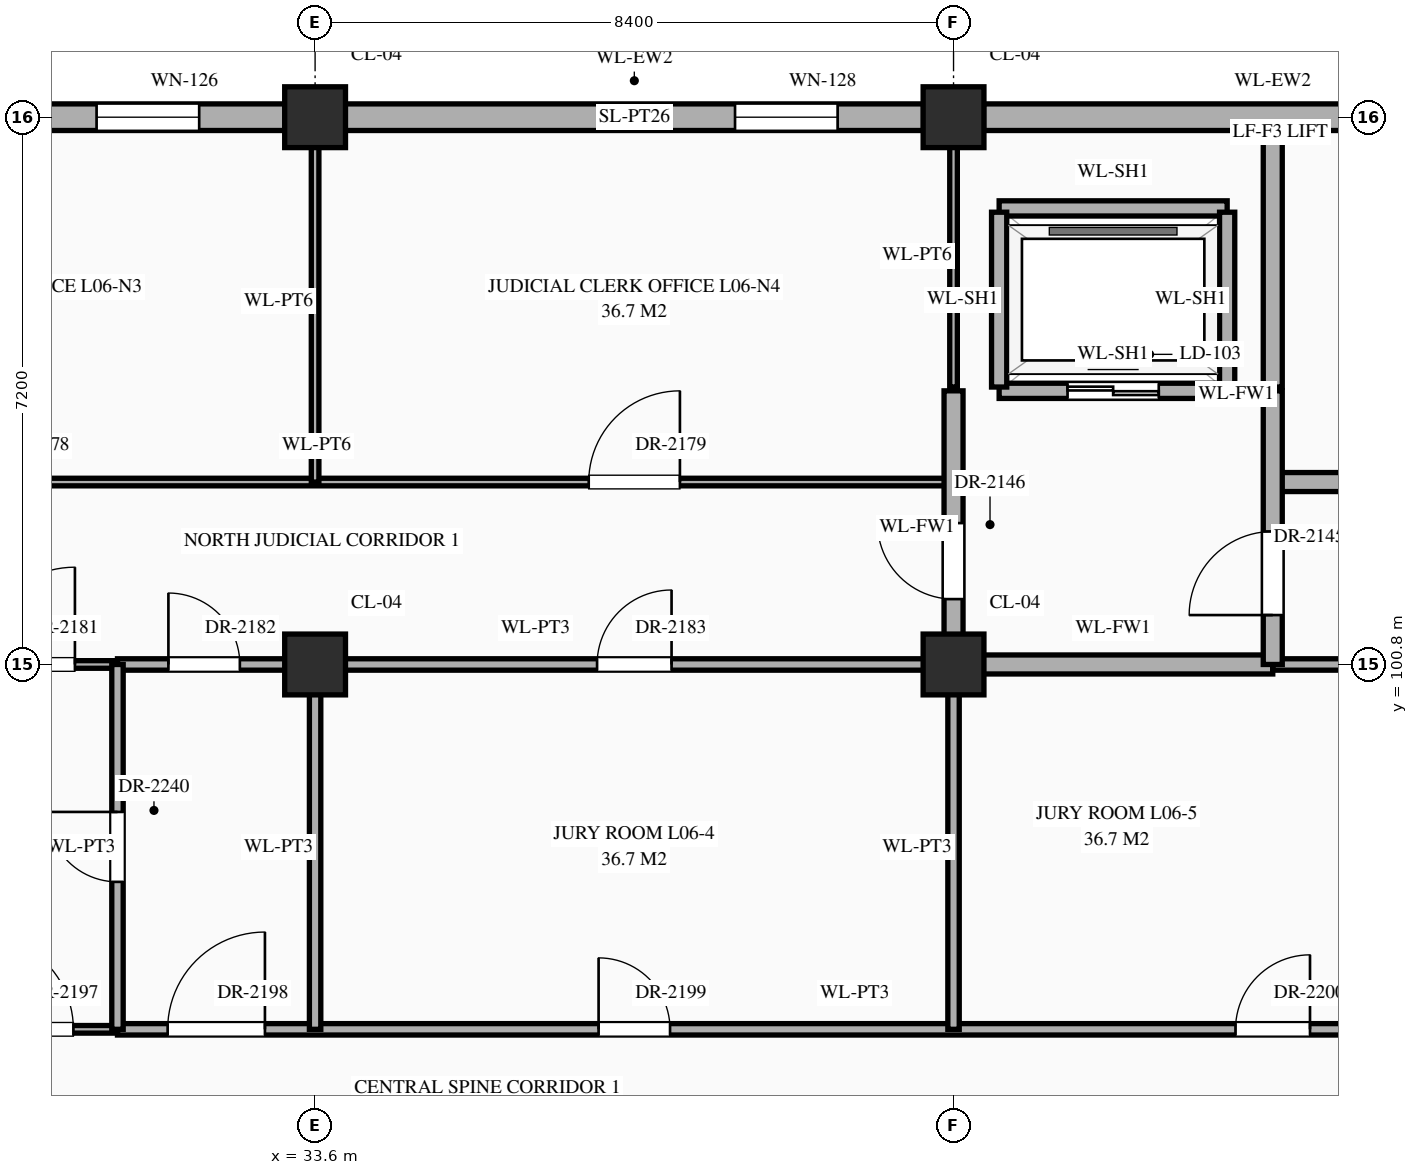
"""IFC4 building model, lengths in metres.
Left out: names, types, materials, properties, quantities, classifications, styles, units other than length and angle.
Written with IfcOpenShell. Run it as: python <this file> out.ifc"""

import sys

from ifc_helpers import new_model, si_unit, direction, frame, frame_2d, origin, origin_2d, place, context, subcontext, project, spatial, rectangle, extrude, element, fill, save


model = new_model("IFC4")
c1 = context("Model", 3, precision=1e-05, world=origin(), true_north=direction((0.0, 1.0)))
c2 = subcontext(c1, "Body", "Model", "MODEL_VIEW")
j1 = project(units=[si_unit("LENGTHUNIT", "METRE"), si_unit("PLANEANGLEUNIT", "RADIAN")], contexts=[c1])
p1 = place(None, origin())
s1 = spatial("IfcSite", under=j1, at=p1, CompositionType="ELEMENT")
p2 = place(p1, origin())
s2 = spatial("IfcBuilding", under=s1, at=p2, CompositionType="ELEMENT")
p3 = place(p2, frame((0.0, 0.0, 26.1)))
s3 = spatial("IfcBuildingStorey", under=s2, at=p3, CompositionType="ELEMENT", Elevation=26.1)
for number, where, z_axis, x_axis in (
    (1, (33.6, 100.8, 0.0), (0.0, 0.0, 1.0), (1.0, 0.0, 0.0)),
    (2, (33.6, 108.0, 0.0), (0.0, 0.0, 1.0), (1.0, 0.0, 0.0)),
    (3, (42.0, 100.8, 0.0), (0.0, 0.0, 1.0), (1.0, 0.0, 0.0)),
    (4, (42.0, 108.0, 0.0), (0.0, 0.0, 1.0), (1.0, 0.0, 0.0)),
):
    element("IfcColumn", number, at=place(p3, frame(where, z_axis=z_axis, x_axis=x_axis)), inside=s3, PredefinedType="COLUMN", context=c2, shape_type="SweptSolid", body=[
        extrude(rectangle(XDim=0.8, YDim=0.8, at=origin_2d()), origin(), (0.0, 0.0, 1.0), 4.5),
    ])
p4 = place(p3, frame((25.595, 108.0, 0.0), z_axis=(0.0, 0.0, 1.0), x_axis=(1.0, 0.0, 0.0)))
e5 = element("IfcWall", 5, at=p4, inside=s3, PredefinedType="STANDARD", context=c2, shape_type="SweptSolid", body=[
    extrude(rectangle(XDim=7.61, YDim=0.35, at=frame_2d((3.805, 0.0))), origin(), (0.0, 0.0, 1.0), 3.59),
])
p5 = place(p4, frame((5.13, 0.0, 0.85)))
e6 = element("IfcOpeningElement", 6, at=p5, cuts=e5, PredefinedType="OPENING", context=c2, shape_type="SweptSolid", body=[
    extrude(rectangle(XDim=1.35, YDim=1.74, at=frame_2d((0.675, 0.87))), frame((0.0, 0.187, 0.0), z_axis=(0.0, -1.0, 0.0), x_axis=(1.0, 0.0, 0.0)), (0.0, 0.0, 1.0), 0.374),
])
p6 = place(p3, frame((33.995, 108.0, 0.0), z_axis=(0.0, 0.0, 1.0), x_axis=(1.0, 0.0, 0.0)))
e7 = element("IfcWall", 7, at=p6, inside=s3, PredefinedType="STANDARD", context=c2, shape_type="SweptSolid", body=[
    extrude(rectangle(XDim=7.61, YDim=0.35, at=frame_2d((3.805, 0.0))), origin(), (0.0, 0.0, 1.0), 3.59),
])
p7 = place(p6, frame((5.13, 0.0, 0.85)))
e8 = element("IfcOpeningElement", 8, at=p7, cuts=e7, PredefinedType="OPENING", context=c2, shape_type="SweptSolid", body=[
    extrude(rectangle(XDim=1.35, YDim=1.92, at=frame_2d((0.675, 0.96))), frame((0.0, 0.187, 0.0), z_axis=(0.0, -1.0, 0.0), x_axis=(1.0, 0.0, 0.0)), (0.0, 0.0, 1.0), 0.374),
])
p8 = place(p3, frame((42.395, 108.0, 0.0), z_axis=(0.0, 0.0, 1.0), x_axis=(1.0, 0.0, 0.0)))
e9 = element("IfcWall", 9, at=p8, inside=s3, PredefinedType="STANDARD", context=c2, shape_type="SweptSolid", body=[
    extrude(rectangle(XDim=7.61, YDim=0.35, at=frame_2d((3.805, 0.0))), origin(), (0.0, 0.0, 1.0), 3.59),
])
p9 = place(p3, frame((25.24, 96.0, 0.0), z_axis=(0.0, 0.0, 1.0), x_axis=(1.0, 0.0, 0.0)))
e10 = element("IfcWall", 10, at=p9, inside=s3, PredefinedType="STANDARD", context=c2, shape_type="SweptSolid", body=[
    extrude(rectangle(XDim=5.76, YDim=0.1, at=frame_2d((2.88, 0.0))), origin(), (0.0, 0.0, 1.0), 4.24),
])
p10 = place(p9, frame((1.08, 0.0, 0.0)))
e11 = element("IfcOpeningElement", 11, at=p10, cuts=e10, PredefinedType="OPENING", context=c2, shape_type="SweptSolid", body=[
    extrude(rectangle(XDim=1.2, YDim=2.35, at=frame_2d((0.6, 1.175))), frame((0.0, 0.062, 0.0), z_axis=(0.0, -1.0, 0.0), x_axis=(1.0, 0.0, 0.0)), (0.0, 0.0, 1.0), 0.124),
])
p11 = place(p9, frame((3.94, 0.0, 0.0)))
e12 = element("IfcOpeningElement", 12, at=p11, cuts=e10, PredefinedType="OPENING", context=c2, shape_type="SweptSolid", body=[
    extrude(rectangle(XDim=1.24, YDim=2.3, at=frame_2d((0.62, 1.15))), frame((0.0, 0.062, 0.0), z_axis=(0.0, -1.0, 0.0), x_axis=(1.0, 0.0, 0.0)), (0.0, 0.0, 1.0), 0.124),
])
p12 = place(p3, frame((31.0, 96.0, 0.0), z_axis=(0.0, 0.0, 1.0), x_axis=(1.0, 0.0, 0.0)))
e13 = element("IfcWall", 13, at=p12, inside=s3, PredefinedType="STANDARD", context=c2, shape_type="SweptSolid", body=[
    extrude(rectangle(XDim=19.4, YDim=0.15, at=frame_2d((9.7, 0.0))), origin(), (0.0, 0.0, 1.0), 4.24),
])
p13 = place(p12, frame((0.66, 0.0, 0.0)))
e14 = element("IfcOpeningElement", 14, at=p13, cuts=e13, PredefinedType="OPENING", context=c2, shape_type="SweptSolid", body=[
    extrude(rectangle(XDim=1.28, YDim=2.35, at=frame_2d((0.64, 1.175))), frame((0.0, 0.087, 0.0), z_axis=(0.0, -1.0, 0.0), x_axis=(1.0, 0.0, 0.0)), (0.0, 0.0, 1.0), 0.174),
])
p14 = place(p12, frame((6.33, 0.0, 0.0)))
e15 = element("IfcOpeningElement", 15, at=p14, cuts=e13, PredefinedType="OPENING", context=c2, shape_type="SweptSolid", body=[
    extrude(rectangle(XDim=0.94, YDim=2.3, at=frame_2d((0.47, 1.15))), frame((0.0, 0.087, 0.0), z_axis=(0.0, -1.0, 0.0), x_axis=(1.0, 0.0, 0.0)), (0.0, 0.0, 1.0), 0.174),
])
p15 = place(p12, frame((14.71, 0.0, 0.0)))
e16 = element("IfcOpeningElement", 16, at=p15, cuts=e13, PredefinedType="OPENING", context=c2, shape_type="SweptSolid", body=[
    extrude(rectangle(XDim=0.98, YDim=2.35, at=frame_2d((0.49, 1.175))), frame((0.0, 0.087, 0.0), z_axis=(0.0, -1.0, 0.0), x_axis=(1.0, 0.0, 0.0)), (0.0, 0.0, 1.0), 0.174),
])
p16 = place(p3, frame((25.24, 100.8, 0.0), z_axis=(0.0, 0.0, 1.0), x_axis=(1.0, 0.0, 0.0)))
e17 = element("IfcWall", 17, at=p16, inside=s3, PredefinedType="STANDARD", context=c2, shape_type="SweptSolid", body=[
    extrude(rectangle(XDim=5.76, YDim=0.1, at=frame_2d((2.88, 0.0))), origin(), (0.0, 0.0, 1.0), 3.39),
])
p17 = place(p16, frame((1.2, 0.0, 0.0)))
e18 = element("IfcOpeningElement", 18, at=p17, cuts=e17, PredefinedType="OPENING", context=c2, shape_type="SweptSolid", body=[
    extrude(rectangle(XDim=1.24, YDim=2.3, at=frame_2d((0.62, 1.15))), frame((0.0, 0.062, 0.0), z_axis=(0.0, -1.0, 0.0), x_axis=(1.0, 0.0, 0.0)), (0.0, 0.0, 1.0), 0.124),
])
p18 = place(p16, frame((3.92, 0.0, 0.0)))
e19 = element("IfcOpeningElement", 19, at=p18, cuts=e17, PredefinedType="OPENING", context=c2, shape_type="SweptSolid", body=[
    extrude(rectangle(XDim=1.28, YDim=2.35, at=frame_2d((0.64, 1.175))), frame((0.0, 0.062, 0.0), z_axis=(0.0, -1.0, 0.0), x_axis=(1.0, 0.0, 0.0)), (0.0, 0.0, 1.0), 0.124),
])
p19 = place(p3, frame((31.0, 100.8, 0.0), z_axis=(0.0, 0.0, 1.0), x_axis=(1.0, 0.0, 0.0)))
e20 = element("IfcWall", 20, at=p19, inside=s3, PredefinedType="STANDARD", context=c2, shape_type="SweptSolid", body=[
    extrude(rectangle(XDim=11.0, YDim=0.15, at=frame_2d((5.5, 0.0))), origin(), (0.0, 0.0, 1.0), 3.39),
])
p20 = place(p19, frame((0.67, 0.0, 0.0)))
e21 = element("IfcOpeningElement", 21, at=p20, cuts=e20, PredefinedType="OPENING", context=c2, shape_type="SweptSolid", body=[
    extrude(rectangle(XDim=0.94, YDim=2.3, at=frame_2d((0.47, 1.15))), frame((0.0, 0.087, 0.0), z_axis=(0.0, -1.0, 0.0), x_axis=(1.0, 0.0, 0.0)), (0.0, 0.0, 1.0), 0.174),
])
p21 = place(p19, frame((6.31, 0.0, 0.0)))
e22 = element("IfcOpeningElement", 22, at=p21, cuts=e20, PredefinedType="OPENING", context=c2, shape_type="SweptSolid", body=[
    extrude(rectangle(XDim=0.98, YDim=2.35, at=frame_2d((0.49, 1.175))), frame((0.0, 0.087, 0.0), z_axis=(0.0, -1.0, 0.0), x_axis=(1.0, 0.0, 0.0)), (0.0, 0.0, 1.0), 0.174),
])
p22 = place(p3, frame((42.0, 100.8, 0.0), z_axis=(0.0, 0.0, 1.0), x_axis=(1.0, 0.0, 0.0)))
e23 = element("IfcWall", 23, at=p22, inside=s3, PredefinedType="STANDARD", context=c2, shape_type="SweptSolid", body=[
    extrude(rectangle(XDim=4.2, YDim=0.25, at=frame_2d((2.1, 0.0))), origin(), (0.0, 0.0, 1.0), 3.39),
])
p23 = place(p3, frame((46.2, 100.8, 0.0), z_axis=(0.0, 0.0, 1.0), x_axis=(1.0, 0.0, 0.0)))
e24 = element("IfcWall", 24, at=p23, inside=s3, PredefinedType="STANDARD", context=c2, shape_type="SweptSolid", body=[
    extrude(rectangle(XDim=4.2, YDim=0.15, at=frame_2d((2.1, 0.0))), origin(), (0.0, 0.0, 1.0), 3.39),
])
p24 = place(p23, frame((1.45, 0.0, 0.0)))
e25 = element("IfcOpeningElement", 25, at=p24, cuts=e24, PredefinedType="OPENING", context=c2, shape_type="SweptSolid", body=[
    extrude(rectangle(XDim=0.98, YDim=2.35, at=frame_2d((0.49, 1.175))), frame((0.0, 0.087, 0.0), z_axis=(0.0, -1.0, 0.0), x_axis=(1.0, 0.0, 0.0)), (0.0, 0.0, 1.0), 0.174),
])
p25 = place(p3, frame((25.24, 103.2, 0.0), z_axis=(0.0, 0.0, 1.0), x_axis=(1.0, 0.0, 0.0)))
e26 = element("IfcWall", 26, at=p25, inside=s3, PredefinedType="STANDARD", context=c2, shape_type="SweptSolid", body=[
    extrude(rectangle(XDim=16.76, YDim=0.1, at=frame_2d((8.38, 0.0))), origin(), (0.0, 0.0, 1.0), 4.24),
])
p26 = place(p25, frame((3.6, 0.0, 0.0)))
e27 = element("IfcOpeningElement", 27, at=p26, cuts=e26, PredefinedType="OPENING", context=c2, shape_type="SweptSolid", body=[
    extrude(rectangle(XDim=1.16, YDim=2.3, at=frame_2d((0.58, 1.15))), frame((0.0, 0.062, 0.0), z_axis=(0.0, -1.0, 0.0), x_axis=(1.0, 0.0, 0.0)), (0.0, 0.0, 1.0), 0.124),
])
p27 = place(p25, frame((11.96, 0.0, 0.0)))
e28 = element("IfcOpeningElement", 28, at=p27, cuts=e26, PredefinedType="OPENING", context=c2, shape_type="SweptSolid", body=[
    extrude(rectangle(XDim=1.2, YDim=2.35, at=frame_2d((0.6, 1.175))), frame((0.0, 0.062, 0.0), z_axis=(0.0, -1.0, 0.0), x_axis=(1.0, 0.0, 0.0)), (0.0, 0.0, 1.0), 0.124),
])
p28 = place(p3, frame((46.2, 103.2, 0.0), z_axis=(0.0, 0.0, 1.0), x_axis=(1.0, 0.0, 0.0)))
e29 = element("IfcWall", 29, at=p28, inside=s3, PredefinedType="STANDARD", context=c2, shape_type="SweptSolid", body=[
    extrude(rectangle(XDim=4.2, YDim=0.25, at=frame_2d((2.1, 0.0))), origin(), (0.0, 0.0, 1.0), 4.24),
])
p29 = place(p28, frame((1.625, 0.0, 0.0)))
e30 = element("IfcOpeningElement", 30, at=p29, cuts=e29, PredefinedType="OPENING", context=c2, shape_type="SweptSolid", body=[
    extrude(rectangle(XDim=0.95, YDim=2.15, at=frame_2d((0.475, 1.075))), frame((0.0, 0.137, 0.0), z_axis=(0.0, -1.0, 0.0), x_axis=(1.0, 0.0, 0.0)), (0.0, 0.0, 1.0), 0.274),
])
p30 = place(p3, frame((42.6, 104.4, 0.0), z_axis=(0.0, 0.0, 1.0), x_axis=(1.0, 0.0, 0.0)))
e31 = element("IfcWall", 31, at=p30, inside=s3, PredefinedType="STANDARD", context=c2, shape_type="SweptSolid", body=[
    extrude(rectangle(XDim=3.0, YDim=0.2, at=frame_2d((1.5, 0.0))), origin(), (0.0, 0.0, 1.0), 4.24),
])
p31 = place(p30, frame((0.9, 0.0, 0.0)))
e32 = element("IfcOpeningElement", 32, at=p31, cuts=e31, PredefinedType="OPENING", context=c2, shape_type="SweptSolid", body=[
    extrude(rectangle(XDim=1.2, YDim=2.15, at=frame_2d((0.6, 1.075))), frame((0.0, 0.112, 0.0), z_axis=(0.0, -1.0, 0.0), x_axis=(1.0, 0.0, 0.0)), (0.0, 0.0, 1.0), 0.224),
])
p32 = place(p3, frame((42.6, 106.8, 0.0), z_axis=(0.0, 0.0, 1.0), x_axis=(1.0, 0.0, 0.0)))
e33 = element("IfcWall", 33, at=p32, inside=s3, PredefinedType="STANDARD", context=c2, shape_type="SweptSolid", body=[
    extrude(rectangle(XDim=3.0, YDim=0.2, at=frame_2d((1.5, 0.0))), origin(), (0.0, 0.0, 1.0), 4.24),
])
p33 = place(p3, frame((31.0, 96.0, 0.0), z_axis=(0.0, 0.0, 1.0), x_axis=(0.0, 1.0, 0.0)))
e34 = element("IfcWall", 34, at=p33, inside=s3, PredefinedType="STANDARD", context=c2, shape_type="SweptSolid", body=[
    extrude(rectangle(XDim=4.8, YDim=0.15, at=frame_2d((2.4, 0.0))), origin(), (0.0, 0.0, 1.0), 4.24),
])
p34 = place(p33, frame((1.94, 0.0, 0.0)))
e35 = element("IfcOpeningElement", 35, at=p34, cuts=e34, PredefinedType="OPENING", context=c2, shape_type="SweptSolid", body=[
    extrude(rectangle(XDim=0.92, YDim=2.15, at=frame_2d((0.46, 1.075))), frame((0.0, 0.087, 0.0), z_axis=(0.0, -1.0, 0.0), x_axis=(1.0, 0.0, 0.0)), (0.0, 0.0, 1.0), 0.174),
])
p35 = place(p3, frame((33.6, 96.0, 0.0), z_axis=(0.0, 0.0, 1.0), x_axis=(0.0, 1.0, 0.0)))
e36 = element("IfcWall", 36, at=p35, inside=s3, PredefinedType="STANDARD", context=c2, shape_type="SweptSolid", body=[
    extrude(rectangle(XDim=4.8, YDim=0.15, at=frame_2d((2.4, 0.0))), origin(), (0.0, 0.0, 1.0), 4.24),
])
p36 = place(p3, frame((33.6, 103.2, 0.0), z_axis=(0.0, 0.0, 1.0), x_axis=(0.0, 1.0, 0.0)))
e37 = element("IfcWall", 37, at=p36, inside=s3, PredefinedType="STANDARD", context=c2, shape_type="SweptSolid", body=[
    extrude(rectangle(XDim=4.76, YDim=0.1, at=frame_2d((2.38, 0.0))), origin(), (0.0, 0.0, 1.0), 3.49),
])
p37 = place(p3, frame((42.0, 96.0, 0.0), z_axis=(0.0, 0.0, 1.0), x_axis=(0.0, 1.0, 0.0)))
e38 = element("IfcWall", 38, at=p37, inside=s3, PredefinedType="STANDARD", context=c2, shape_type="SweptSolid", body=[
    extrude(rectangle(XDim=4.8, YDim=0.15, at=frame_2d((2.4, 0.0))), origin(), (0.0, 0.0, 1.0), 3.49),
])
p38 = place(p3, frame((42.0, 100.8, 0.0), z_axis=(0.0, 0.0, 1.0), x_axis=(0.0, 1.0, 0.0)))
e39 = element("IfcWall", 39, at=p38, inside=s3, PredefinedType="STANDARD", context=c2, shape_type="SweptSolid", body=[
    extrude(rectangle(XDim=3.6, YDim=0.25, at=frame_2d((1.8, 0.0))), origin(), (0.0, 0.0, 1.0), 3.49),
])
p39 = place(p38, frame((0.86, 0.0, 0.0)))
e40 = element("IfcOpeningElement", 40, at=p39, cuts=e39, PredefinedType="OPENING", context=c2, shape_type="SweptSolid", body=[
    extrude(rectangle(XDim=1.0, YDim=2.2, at=frame_2d((0.5, 1.1))), frame((0.0, 0.137, 0.0), z_axis=(0.0, -1.0, 0.0), x_axis=(1.0, 0.0, 0.0)), (0.0, 0.0, 1.0), 0.274),
])
p40 = place(p3, frame((42.0, 104.45, 0.0), z_axis=(0.0, 0.0, 1.0), x_axis=(0.0, 1.0, 0.0)))
e41 = element("IfcWall", 41, at=p40, inside=s3, PredefinedType="STANDARD", context=c2, shape_type="SweptSolid", body=[
    extrude(rectangle(XDim=3.46, YDim=0.1, at=frame_2d((1.73, 0.0))), origin(), (0.0, 0.0, 1.0), 3.49),
])
for number, where, z_axis, x_axis in (
    (42, (42.6, 104.45, 0.0), (0.0, 0.0, 1.0), (0.0, 1.0, 0.0)),
    (43, (45.6, 104.45, 0.0), (0.0, 0.0, 1.0), (0.0, 1.0, 0.0)),
):
    element("IfcWall", number, at=place(p3, frame(where, z_axis=z_axis, x_axis=x_axis)), inside=s3, PredefinedType="STANDARD", context=c2, shape_type="SweptSolid", body=[
        extrude(rectangle(XDim=2.3, YDim=0.2, at=frame_2d((1.15, 0.0))), origin(), (0.0, 0.0, 1.0), 4.24),
    ])
p41 = place(p3, frame((46.2, 100.8, 0.0), z_axis=(0.0, 0.0, 1.0), x_axis=(0.0, 1.0, 0.0)))
e44 = element("IfcWall", 44, at=p41, inside=s3, PredefinedType="STANDARD", context=c2, shape_type="SweptSolid", body=[
    extrude(rectangle(XDim=3.6, YDim=0.25, at=frame_2d((1.8, 0.0))), origin(), (0.0, 0.0, 1.0), 3.89),
])
p42 = place(p41, frame((0.65, 0.0, 0.0)))
e45 = element("IfcOpeningElement", 45, at=p42, cuts=e44, PredefinedType="OPENING", context=c2, shape_type="SweptSolid", body=[
    extrude(rectangle(XDim=1.1, YDim=2.2, at=frame_2d((0.55, 1.1))), frame((0.0, 0.137, 0.0), z_axis=(0.0, -1.0, 0.0), x_axis=(1.0, 0.0, 0.0)), (0.0, 0.0, 1.0), 0.274),
])
p43 = place(p3, frame((46.2, 104.45, 0.0), z_axis=(0.0, 0.0, 1.0), x_axis=(0.0, 1.0, 0.0)))
e46 = element("IfcWall", 46, at=p43, inside=s3, PredefinedType="STANDARD", context=c2, shape_type="SweptSolid", body=[
    extrude(rectangle(XDim=3.46, YDim=0.25, at=frame_2d((1.73, 0.0))), origin(), (0.0, 0.0, 1.0), 3.89),
])
p44 = place(p5, origin())
e47 = element("IfcWindow", 47, at=p44, inside=s3, PartitioningType="SINGLE_PANEL", PredefinedType="WINDOW", context=c2, shape_type="SweptSolid", body=[
    extrude(rectangle(XDim=1.35, YDim=1.74, at=frame_2d((0.675, 0.87))), frame((0.0, 0.03, 0.0), z_axis=(0.0, -1.0, 0.0), x_axis=(1.0, 0.0, 0.0)), (0.0, 0.0, 1.0), 0.06),
])
fill(e6, e47)
p45 = place(p7, origin())
e48 = element("IfcWindow", 48, at=p45, inside=s3, PartitioningType="SINGLE_PANEL", PredefinedType="WINDOW", context=c2, shape_type="SweptSolid", body=[
    extrude(rectangle(XDim=1.35, YDim=1.92, at=frame_2d((0.675, 0.96))), frame((0.0, 0.03, 0.0), z_axis=(0.0, -1.0, 0.0), x_axis=(1.0, 0.0, 0.0)), (0.0, 0.0, 1.0), 0.06),
])
fill(e8, e48)
p46 = place(p31, origin())
e49 = element("IfcDoor", 49, at=p46, inside=s3, OperationType="DOUBLE_DOOR_SLIDING", PredefinedType="DOOR", context=c2, shape_type="SweptSolid", body=[
    extrude(rectangle(XDim=1.2, YDim=2.15, at=frame_2d((0.6, 1.075))), frame((0.0, 0.025, 0.0), z_axis=(0.0, -1.0, 0.0), x_axis=(1.0, 0.0, 0.0)), (0.0, 0.0, 1.0), 0.05),
])
fill(e32, e49)
p47 = place(p42, origin())
e50 = element("IfcDoor", 50, at=p47, inside=s3, OperationType="SINGLE_SWING_LEFT", PredefinedType="DOOR", context=c2, shape_type="SweptSolid", body=[
    extrude(rectangle(XDim=1.1, YDim=2.2, at=frame_2d((0.55, 1.1))), frame((0.0, 0.025, 0.0), z_axis=(0.0, -1.0, 0.0), x_axis=(1.0, 0.0, 0.0)), (0.0, 0.0, 1.0), 0.05),
])
fill(e45, e50)
p48 = place(p39, origin())
e51 = element("IfcDoor", 51, at=p48, inside=s3, OperationType="SINGLE_SWING_RIGHT", PredefinedType="DOOR", context=c2, shape_type="SweptSolid", body=[
    extrude(rectangle(XDim=1.0, YDim=2.2, at=frame_2d((0.5, 1.1))), frame((0.0, 0.025, 0.0), z_axis=(0.0, -1.0, 0.0), x_axis=(1.0, 0.0, 0.0)), (0.0, 0.0, 1.0), 0.05),
])
fill(e40, e51)
p49 = place(p27, origin())
e52 = element("IfcDoor", 52, at=p49, inside=s3, OperationType="SINGLE_SWING_RIGHT", PredefinedType="DOOR", context=c2, shape_type="SweptSolid", body=[
    extrude(rectangle(XDim=1.2, YDim=2.35, at=frame_2d((0.6, 1.175))), frame((0.0, 0.025, 0.0), z_axis=(0.0, -1.0, 0.0), x_axis=(1.0, 0.0, 0.0)), (0.0, 0.0, 1.0), 0.05),
])
fill(e28, e52)
p50 = place(p18, origin())
e53 = element("IfcDoor", 53, at=p50, inside=s3, OperationType="SINGLE_SWING_RIGHT", PredefinedType="DOOR", context=c2, shape_type="SweptSolid", body=[
    extrude(rectangle(XDim=1.28, YDim=2.35, at=frame_2d((0.64, 1.175))), frame((0.0, 0.025, 0.0), z_axis=(0.0, -1.0, 0.0), x_axis=(1.0, 0.0, 0.0)), (0.0, 0.0, 1.0), 0.05),
])
fill(e19, e53)
p51 = place(p20, origin())
e54 = element("IfcDoor", 54, at=p51, inside=s3, OperationType="SINGLE_SWING_LEFT", PredefinedType="DOOR", context=c2, shape_type="SweptSolid", body=[
    extrude(rectangle(XDim=0.94, YDim=2.3, at=frame_2d((0.47, 1.15))), frame((0.0, 0.025, 0.0), z_axis=(0.0, -1.0, 0.0), x_axis=(1.0, 0.0, 0.0)), (0.0, 0.0, 1.0), 0.05),
])
fill(e21, e54)
p52 = place(p21, origin())
e55 = element("IfcDoor", 55, at=p52, inside=s3, OperationType="SINGLE_SWING_RIGHT", PredefinedType="DOOR", context=c2, shape_type="SweptSolid", body=[
    extrude(rectangle(XDim=0.98, YDim=2.35, at=frame_2d((0.49, 1.175))), frame((0.0, 0.025, 0.0), z_axis=(0.0, -1.0, 0.0), x_axis=(1.0, 0.0, 0.0)), (0.0, 0.0, 1.0), 0.05),
])
fill(e22, e55)
p53 = place(p11, origin())
e56 = element("IfcDoor", 56, at=p53, inside=s3, OperationType="SINGLE_SWING_LEFT", PredefinedType="DOOR", context=c2, shape_type="SweptSolid", body=[
    extrude(rectangle(XDim=1.24, YDim=2.3, at=frame_2d((0.62, 1.15))), frame((0.0, 0.025, 0.0), z_axis=(0.0, -1.0, 0.0), x_axis=(1.0, 0.0, 0.0)), (0.0, 0.0, 1.0), 0.05),
])
fill(e12, e56)
p54 = place(p13, origin())
e57 = element("IfcDoor", 57, at=p54, inside=s3, OperationType="SINGLE_SWING_RIGHT", PredefinedType="DOOR", context=c2, shape_type="SweptSolid", body=[
    extrude(rectangle(XDim=1.28, YDim=2.35, at=frame_2d((0.64, 1.175))), frame((0.0, 0.025, 0.0), z_axis=(0.0, -1.0, 0.0), x_axis=(1.0, 0.0, 0.0)), (0.0, 0.0, 1.0), 0.05),
])
fill(e14, e57)
p55 = place(p14, origin())
e58 = element("IfcDoor", 58, at=p55, inside=s3, OperationType="SINGLE_SWING_LEFT", PredefinedType="DOOR", context=c2, shape_type="SweptSolid", body=[
    extrude(rectangle(XDim=0.94, YDim=2.3, at=frame_2d((0.47, 1.15))), frame((0.0, 0.025, 0.0), z_axis=(0.0, -1.0, 0.0), x_axis=(1.0, 0.0, 0.0)), (0.0, 0.0, 1.0), 0.05),
])
fill(e15, e58)
p56 = place(p15, origin())
e59 = element("IfcDoor", 59, at=p56, inside=s3, OperationType="SINGLE_SWING_RIGHT", PredefinedType="DOOR", context=c2, shape_type="SweptSolid", body=[
    extrude(rectangle(XDim=0.98, YDim=2.35, at=frame_2d((0.49, 1.175))), frame((0.0, 0.025, 0.0), z_axis=(0.0, -1.0, 0.0), x_axis=(1.0, 0.0, 0.0)), (0.0, 0.0, 1.0), 0.05),
])
fill(e16, e59)
p57 = place(p34, origin())
e60 = element("IfcDoor", 60, at=p57, inside=s3, OperationType="SINGLE_SWING_RIGHT", PredefinedType="DOOR", context=c2, shape_type="SweptSolid", body=[
    extrude(rectangle(XDim=0.92, YDim=2.15, at=frame_2d((0.46, 1.075))), frame((0.0, 0.025, 0.0), z_axis=(0.0, -1.0, 0.0), x_axis=(1.0, 0.0, 0.0)), (0.0, 0.0, 1.0), 0.05),
])
fill(e35, e60)
save(model, sys.argv[1])
